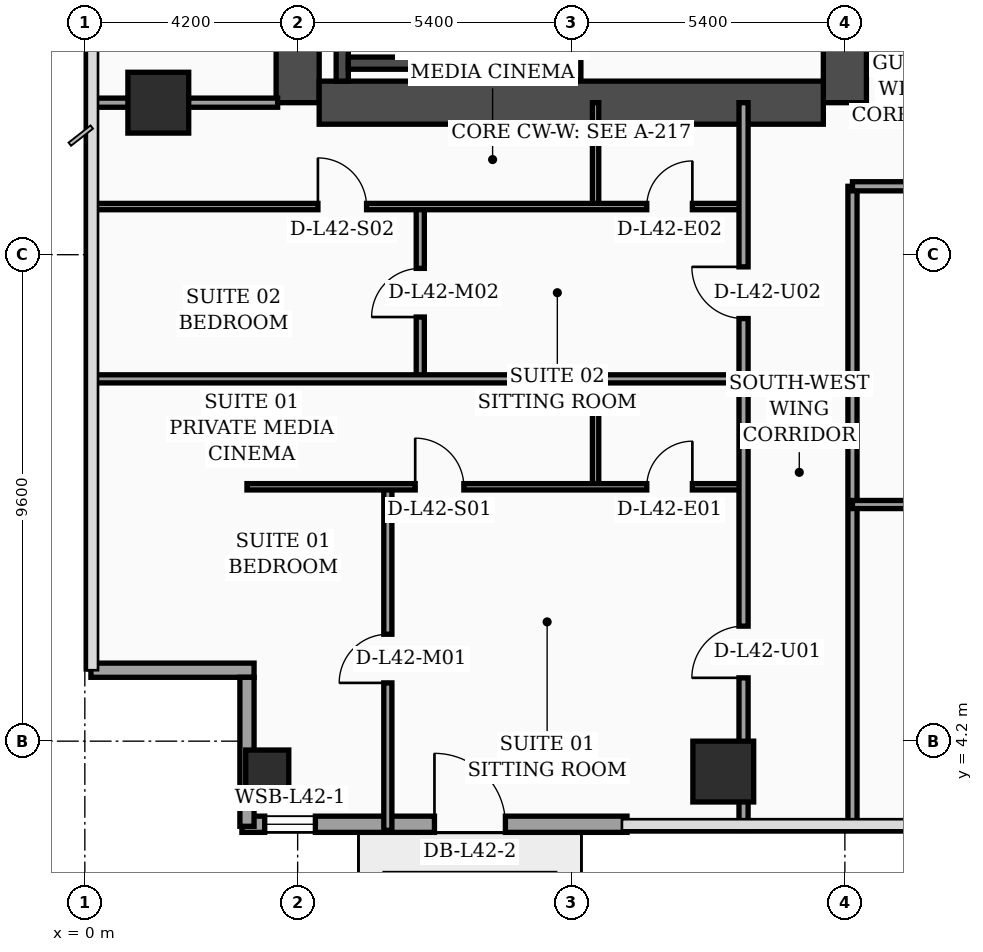
"""IFC4 building model, lengths in metres.
Left out: names, types, materials, properties, quantities, classifications, styles, units other than length and angle.
Written with IfcOpenShell. Run it as: python <this file> out.ifc"""

import sys

from ifc_helpers import new_model, si_unit, direction, frame, frame_2d, origin, origin_2d, place, context, subcontext, project, spatial, rectangle, hollow_rectangle, extrude, element, fill, save


model = new_model("IFC4")
c1 = context("Model", 3, precision=1e-05, world=origin(), true_north=direction((0.0, 1.0)))
c2 = subcontext(c1, "Body", "Model", "MODEL_VIEW")
j1 = project(units=[si_unit("LENGTHUNIT", "METRE"), si_unit("PLANEANGLEUNIT", "RADIAN")], contexts=[c1])
p1 = place(None, origin())
s1 = spatial("IfcSite", under=j1, at=p1, CompositionType="ELEMENT")
p2 = place(p1, origin())
s2 = spatial("IfcBuilding", under=s1, at=p2, CompositionType="ELEMENT")
p3 = place(p2, frame((0.0, 0.0, 171.3)))
s3 = spatial("IfcBuildingStorey", under=s2, at=p3, CompositionType="ELEMENT", Elevation=171.3)
p4 = place(p3, frame((4.2, 16.8, 0.0), z_axis=(0.0, 0.0, 1.0), x_axis=(0.0, 1.0, 0.0)))
e1 = element("IfcWall", 1, at=p4, inside=s3, PredefinedType="SHEAR", context=c2, shape_type="SweptSolid", body=[
    extrude(rectangle(XDim=21.6, YDim=0.85, at=frame_2d((10.8, 0.0))), origin(), (0.0, 0.0, 1.0), 3.56),
])
p5 = place(p3, frame((15.0, 16.8, 0.0), z_axis=(0.0, 0.0, 1.0), x_axis=(0.0, 1.0, 0.0)))
e2 = element("IfcWall", 2, at=p5, inside=s3, PredefinedType="SHEAR", context=c2, shape_type="SweptSolid", body=[
    extrude(rectangle(XDim=21.6, YDim=0.85, at=frame_2d((10.8, 0.0))), origin(), (0.0, 0.0, 1.0), 3.56),
])
p6 = place(p5, frame((8.65, 0.0, 0.0)))
e3 = element("IfcOpeningElement", 3, at=p6, cuts=e2, PredefinedType="OPENING", context=c2, shape_type="SweptSolid", body=[
    extrude(rectangle(XDim=1.1, YDim=2.2, at=frame_2d((0.55, 1.1))), frame((0.0, 0.435, 0.0), z_axis=(0.0, -1.0, 0.0), x_axis=(1.0, 0.0, 0.0)), (0.0, 0.0, 1.0), 0.87),
])
p7 = place(p5, frame((10.85, 0.0, 0.0)))
e4 = element("IfcOpeningElement", 4, at=p7, cuts=e2, PredefinedType="OPENING", context=c2, shape_type="SweptSolid", body=[
    extrude(rectangle(XDim=1.1, YDim=2.2, at=frame_2d((0.55, 1.1))), frame((0.0, 0.435, 0.0), z_axis=(0.0, -1.0, 0.0), x_axis=(1.0, 0.0, 0.0)), (0.0, 0.0, 1.0), 0.87),
])
p8 = place(p5, frame((13.5, 0.0, 0.0)))
e5 = element("IfcOpeningElement", 5, at=p8, cuts=e2, PredefinedType="OPENING", context=c2, shape_type="SweptSolid", body=[
    extrude(rectangle(XDim=1.1, YDim=2.2, at=frame_2d((0.55, 1.1))), frame((0.0, 0.435, 0.0), z_axis=(0.0, -1.0, 0.0), x_axis=(1.0, 0.0, 0.0)), (0.0, 0.0, 1.0), 0.87),
])
p9 = place(p5, frame((16.15, 0.0, 0.0)))
e6 = element("IfcOpeningElement", 6, at=p9, cuts=e2, PredefinedType="OPENING", context=c2, shape_type="SweptSolid", body=[
    extrude(rectangle(XDim=1.1, YDim=2.2, at=frame_2d((0.55, 1.1))), frame((0.0, 0.435, 0.0), z_axis=(0.0, -1.0, 0.0), x_axis=(1.0, 0.0, 0.0)), (0.0, 0.0, 1.0), 0.87),
])
p10 = place(p3, frame((4.625, 16.8, 0.0), z_axis=(0.0, 0.0, 1.0), x_axis=(1.0, 0.0, 0.0)))
e7 = element("IfcWall", 7, at=p10, inside=s3, PredefinedType="SHEAR", context=c2, shape_type="SweptSolid", body=[
    extrude(rectangle(XDim=9.95, YDim=0.85, at=frame_2d((4.975, 0.0))), origin(), (0.0, 0.0, 1.0), 3.56),
])
p11 = place(p3, frame((5.08, 17.225, 0.0), z_axis=(0.0, 0.0, 1.0), x_axis=(0.0, 1.0, 0.0)))
e8 = element("IfcWall", 8, at=p11, inside=s3, PredefinedType="SOLIDWALL", context=c2, shape_type="SweptSolid", body=[
    extrude(rectangle(XDim=9.565, YDim=0.24, at=frame_2d((4.782, 0.0))), origin(), (0.0, 0.0, 1.0), 3.56),
])
p12 = place(p3, frame((8.42, 17.225, 0.0), z_axis=(0.0, 0.0, 1.0), x_axis=(0.0, 1.0, 0.0)))
e9 = element("IfcWall", 9, at=p12, inside=s3, PredefinedType="SOLIDWALL", context=c2, shape_type="SweptSolid", body=[
    extrude(rectangle(XDim=9.565, YDim=0.24, at=frame_2d((4.782, 0.0))), origin(), (0.0, 0.0, 1.0), 3.56),
])
p13 = place(p12, frame((0.35, 0.0, 0.0)))
e10 = element("IfcOpeningElement", 10, at=p13, cuts=e9, PredefinedType="OPENING", context=c2, shape_type="SweptSolid", body=[
    extrude(rectangle(XDim=1.15, YDim=2.2, at=frame_2d((0.575, 1.1))), frame((0.0, 0.13, 0.0), z_axis=(0.0, -1.0, 0.0), x_axis=(1.0, 0.0, 0.0)), (0.0, 0.0, 1.0), 0.26),
])
p14 = place(p3, frame((5.2, 17.58, 0.0), z_axis=(0.0, 0.0, 1.0), x_axis=(1.0, 0.0, 0.0)))
e11 = element("IfcWall", 11, at=p14, inside=s3, PredefinedType="SOLIDWALL", context=c2, shape_type="SweptSolid", body=[
    extrude(rectangle(XDim=3.1, YDim=0.24, at=frame_2d((1.55, 0.0))), origin(), (0.0, 0.0, 1.0), 3.56),
])
p15 = place(p3, frame((3.6, 3.6, 0.0), z_axis=(0.0, 0.0, 1.0), x_axis=(1.0, 0.0, 0.0)))
e12 = element("IfcColumn", 12, at=p15, inside=s3, PredefinedType="COLUMN", context=c2, shape_type="SweptSolid", body=[
    extrude(hollow_rectangle(XDim=0.85, YDim=0.85, WallThickness=0.036, at=origin_2d()), origin(), (0.0, 0.0, 1.0), 3.56),
])
for number, where, z_axis, x_axis in (
    (13, (1.45, 16.8, 0.0), (0.0, 0.0, 1.0), (1.0, 0.0, 0.0)),
    (14, (12.6, 3.6, 0.0), (0.0, 0.0, 1.0), (1.0, 0.0, 0.0)),
):
    element("IfcColumn", number, at=place(p3, frame(where, z_axis=z_axis, x_axis=x_axis)), inside=s3, PredefinedType="COLUMN", context=c2, shape_type="SweptSolid", body=[
        extrude(rectangle(XDim=1.2, YDim=1.2, at=origin_2d()), origin(), (0.0, 0.0, 1.0), 3.56),
    ])
p16 = place(p3, frame((3.1, 2.56, 0.0), z_axis=(0.0, 0.0, 1.0), x_axis=(1.0, 0.0, 0.0)))
e15 = element("IfcWall", 15, at=p16, inside=s3, PredefinedType="SOLIDWALL", context=c2, shape_type="SweptSolid", body=[
    extrude(rectangle(XDim=7.6, YDim=0.32, at=frame_2d((3.8, 0.0))), origin(), (0.0, 0.0, 1.0), 3.56),
])
p17 = place(p16, frame((0.45, 0.0, 0.75)))
e16 = element("IfcOpeningElement", 16, at=p17, cuts=e15, PredefinedType="OPENING", context=c2, shape_type="SweptSolid", body=[
    extrude(rectangle(XDim=1.0, YDim=1.6, at=frame_2d((0.5, 0.8))), frame((0.0, 0.17, 0.0), z_axis=(0.0, -1.0, 0.0), x_axis=(1.0, 0.0, 0.0)), (0.0, 0.0, 1.0), 0.34),
])
p18 = place(p16, frame((3.8, 0.0, 0.0)))
e17 = element("IfcOpeningElement", 17, at=p18, cuts=e15, PredefinedType="OPENING", context=c2, shape_type="SweptSolid", body=[
    extrude(rectangle(XDim=1.4, YDim=2.25, at=frame_2d((0.7, 1.125))), frame((0.0, 0.17, 0.0), z_axis=(0.0, -1.0, 0.0), x_axis=(1.0, 0.0, 0.0)), (0.0, 0.0, 1.0), 0.34),
])
p19 = place(p3, frame((0.12, 5.6, 0.0), z_axis=(0.0, 0.0, 1.0), x_axis=(1.0, 0.0, 0.0)))
e18 = element("IfcWall", 18, at=p19, inside=s3, PredefinedType="SOLIDWALL", context=c2, shape_type="SweptSolid", body=[
    extrude(rectangle(XDim=3.22, YDim=0.28, at=frame_2d((1.61, 0.0))), origin(), (0.0, 0.0, 1.0), 2.94),
])
p20 = place(p3, frame((3.2, 5.46, 0.0), z_axis=(0.0, 0.0, 1.0), x_axis=(0.0, -1.0, 0.0)))
e19 = element("IfcWall", 19, at=p20, inside=s3, PredefinedType="SOLIDWALL", context=c2, shape_type="SweptSolid", body=[
    extrude(rectangle(XDim=2.94, YDim=0.28, at=frame_2d((1.47, 0.0))), origin(), (0.0, 0.0, 1.0), 2.94),
])
p21 = place(p3, frame((9.68, 17.245, 0.0), z_axis=(0.0, 0.0, 1.0), x_axis=(0.0, 1.0, 0.0)))
e20 = element("IfcWall", 20, at=p21, inside=s3, PredefinedType="SOLIDWALL", context=c2, shape_type="SweptSolid", body=[
    extrude(rectangle(XDim=7.755, YDim=0.22, at=frame_2d((3.877, 0.0))), origin(), (0.0, 0.0, 1.0), 3.56),
])
p22 = place(p3, frame((0.08, 16.8, 0.0), z_axis=(0.0, 0.0, 1.0), x_axis=(1.0, 0.0, 0.0)))
e21 = element("IfcWall", 21, at=p22, inside=s3, PredefinedType="PARTITIONING", context=c2, shape_type="SweptSolid", body=[
    extrude(rectangle(XDim=3.725, YDim=0.18, at=frame_2d((1.862, 0.0))), origin(), (0.0, 0.0, 1.0), 2.94),
])
p23 = place(p3, frame((10.08, 9.22, 0.0), z_axis=(0.0, 0.0, 1.0), x_axis=(0.0, 1.0, 0.0)))
e22 = element("IfcWall", 22, at=p23, inside=s3, PredefinedType="PARTITIONING", context=c2, shape_type="SweptSolid", body=[
    extrude(rectangle(XDim=2.13, YDim=0.125, at=frame_2d((1.065, 0.0))), origin(), (0.0, 0.0, 1.0), 3.09),
])
p24 = place(p3, frame((5.98, 2.44, 0.0), z_axis=(0.0, 0.0, 1.0), x_axis=(0.0, 1.0, 0.0)))
e23 = element("IfcWall", 23, at=p24, inside=s3, PredefinedType="PARTITIONING", context=c2, shape_type="SweptSolid", body=[
    extrude(rectangle(XDim=6.78, YDim=0.16, at=frame_2d((3.39, 0.0))), origin(), (0.0, 0.0, 1.0), 3.04),
])
p25 = place(p24, frame((2.91, 0.0, 0.0)))
e24 = element("IfcOpeningElement", 24, at=p25, cuts=e23, PredefinedType="OPENING", context=c2, shape_type="SweptSolid", body=[
    extrude(rectangle(XDim=0.96, YDim=2.2, at=frame_2d((0.48, 1.1))), frame((0.0, 0.09, 0.0), z_axis=(0.0, -1.0, 0.0), x_axis=(1.0, 0.0, 0.0)), (0.0, 0.0, 1.0), 0.18),
])
p26 = place(p3, frame((3.2, 9.22, 0.0), z_axis=(0.0, 0.0, 1.0), x_axis=(1.0, 0.0, 0.0)))
e25 = element("IfcWall", 25, at=p26, inside=s3, PredefinedType="PARTITIONING", context=c2, shape_type="SweptSolid", body=[
    extrude(rectangle(XDim=9.8, YDim=0.125, at=frame_2d((4.9, 0.0))), origin(), (0.0, 0.0, 1.0), 2.94),
])
p27 = place(p26, frame((3.32, 0.0, 0.0)))
e26 = element("IfcOpeningElement", 26, at=p27, cuts=e25, PredefinedType="OPENING", context=c2, shape_type="SweptSolid", body=[
    extrude(rectangle(XDim=0.96, YDim=2.2, at=frame_2d((0.48, 1.1))), frame((0.0, 0.073, 0.0), z_axis=(0.0, -1.0, 0.0), x_axis=(1.0, 0.0, 0.0)), (0.0, 0.0, 1.0), 0.145),
])
p28 = place(p26, frame((7.89, 0.0, 0.0)))
e27 = element("IfcOpeningElement", 27, at=p28, cuts=e25, PredefinedType="OPENING", context=c2, shape_type="SweptSolid", body=[
    extrude(rectangle(XDim=0.9, YDim=2.15, at=frame_2d((0.45, 1.075))), frame((0.0, 0.073, 0.0), z_axis=(0.0, -1.0, 0.0), x_axis=(1.0, 0.0, 0.0)), (0.0, 0.0, 1.0), 0.145),
])
p29 = place(p3, frame((10.08, 14.75, 0.0), z_axis=(0.0, 0.0, 1.0), x_axis=(0.0, 1.0, 0.0)))
e28 = element("IfcWall", 28, at=p29, inside=s3, PredefinedType="PARTITIONING", context=c2, shape_type="SweptSolid", body=[
    extrude(rectangle(XDim=2.05, YDim=0.125, at=frame_2d((1.025, 0.0))), origin(), (0.0, 0.0, 1.0), 3.56),
])
p30 = place(p3, frame((6.62, 11.35, 0.0), z_axis=(0.0, 0.0, 1.0), x_axis=(0.0, 1.0, 0.0)))
e29 = element("IfcWall", 29, at=p30, inside=s3, PredefinedType="PARTITIONING", context=c2, shape_type="SweptSolid", body=[
    extrude(rectangle(XDim=3.4, YDim=0.16, at=frame_2d((1.7, 0.0))), origin(), (0.0, 0.0, 1.0), 3.56),
])
p31 = place(p30, frame((1.22, 0.0, 0.0)))
e30 = element("IfcOpeningElement", 30, at=p31, cuts=e29, PredefinedType="OPENING", context=c2, shape_type="SweptSolid", body=[
    extrude(rectangle(XDim=0.96, YDim=2.2, at=frame_2d((0.48, 1.1))), frame((0.0, 0.09, 0.0), z_axis=(0.0, -1.0, 0.0), x_axis=(1.0, 0.0, 0.0)), (0.0, 0.0, 1.0), 0.18),
])
p32 = place(p3, frame((0.08, 14.75, 0.0), z_axis=(0.0, 0.0, 1.0), x_axis=(1.0, 0.0, 0.0)))
e31 = element("IfcWall", 31, at=p32, inside=s3, PredefinedType="PARTITIONING", context=c2, shape_type="SweptSolid", body=[
    extrude(rectangle(XDim=12.92, YDim=0.125, at=frame_2d((6.46, 0.0))), origin(), (0.0, 0.0, 1.0), 2.94),
])
p33 = place(p32, frame((4.52, 0.0, 0.0)))
e32 = element("IfcOpeningElement", 32, at=p33, cuts=e31, PredefinedType="OPENING", context=c2, shape_type="SweptSolid", body=[
    extrude(rectangle(XDim=0.96, YDim=2.2, at=frame_2d((0.48, 1.1))), frame((0.0, 0.073, 0.0), z_axis=(0.0, -1.0, 0.0), x_axis=(1.0, 0.0, 0.0)), (0.0, 0.0, 1.0), 0.145),
])
p34 = place(p32, frame((11.01, 0.0, 0.0)))
e33 = element("IfcOpeningElement", 33, at=p34, cuts=e31, PredefinedType="OPENING", context=c2, shape_type="SweptSolid", body=[
    extrude(rectangle(XDim=0.9, YDim=2.15, at=frame_2d((0.45, 1.075))), frame((0.0, 0.073, 0.0), z_axis=(0.0, -1.0, 0.0), x_axis=(1.0, 0.0, 0.0)), (0.0, 0.0, 1.0), 0.145),
])
p35 = place(p3, frame((0.08, 11.35, 0.0), z_axis=(0.0, 0.0, 1.0), x_axis=(1.0, 0.0, 0.0)))
e34 = element("IfcWall", 34, at=p35, inside=s3, PredefinedType="PARTITIONING", context=c2, shape_type="SweptSolid", body=[
    extrude(rectangle(XDim=12.92, YDim=0.16, at=frame_2d((6.46, 0.0))), origin(), (0.0, 0.0, 1.0), 2.94),
])
p36 = place(p3, frame((13.0, 2.44, 0.0), z_axis=(0.0, 0.0, 1.0), x_axis=(0.0, 1.0, 0.0)))
e35 = element("IfcWall", 35, at=p36, inside=s3, PredefinedType="PARTITIONING", context=c2, shape_type="SweptSolid", body=[
    extrude(rectangle(XDim=14.36, YDim=0.18, at=frame_2d((7.18, 0.0))), origin(), (0.0, 0.0, 1.0), 2.94),
])
p37 = place(p36, frame((3.01, 0.0, 0.0)))
e36 = element("IfcOpeningElement", 36, at=p37, cuts=e35, PredefinedType="OPENING", context=c2, shape_type="SweptSolid", body=[
    extrude(rectangle(XDim=1.02, YDim=2.2, at=frame_2d((0.51, 1.1))), frame((0.0, 0.1, 0.0), z_axis=(0.0, -1.0, 0.0), x_axis=(1.0, 0.0, 0.0)), (0.0, 0.0, 1.0), 0.2),
])
p38 = place(p36, frame((10.1, 0.0, 0.0)))
e37 = element("IfcOpeningElement", 37, at=p38, cuts=e35, PredefinedType="OPENING", context=c2, shape_type="SweptSolid", body=[
    extrude(rectangle(XDim=1.02, YDim=2.2, at=frame_2d((0.51, 1.1))), frame((0.0, 0.1, 0.0), z_axis=(0.0, -1.0, 0.0), x_axis=(1.0, 0.0, 0.0)), (0.0, 0.0, 1.0), 0.2),
])
p39 = place(p3, frame((15.15, 2.44, 0.0), z_axis=(0.0, 0.0, 1.0), x_axis=(0.0, 1.0, 0.0)))
e38 = element("IfcWall", 38, at=p39, inside=s3, PredefinedType="PARTITIONING", context=c2, shape_type="SweptSolid", body=[
    extrude(rectangle(XDim=12.71, YDim=0.18, at=frame_2d((6.355, 0.0))), origin(), (0.0, 0.0, 1.0), 3.04),
])
p40 = place(p3, frame((15.15, 8.87, 0.0), z_axis=(0.0, 0.0, 1.0), x_axis=(1.0, 0.0, 0.0)))
e39 = element("IfcWall", 39, at=p40, inside=s3, PredefinedType="PARTITIONING", context=c2, shape_type="SweptSolid", body=[
    extrude(rectangle(XDim=4.45, YDim=0.16, at=frame_2d((2.225, 0.0))), origin(), (0.0, 0.0, 1.0), 3.56),
])
p41 = place(p40, frame((1.75, 0.0, 0.0)))
e40 = element("IfcOpeningElement", 40, at=p41, cuts=e39, PredefinedType="OPENING", context=c2, shape_type="SweptSolid", body=[
    extrude(rectangle(XDim=0.96, YDim=2.2, at=frame_2d((0.48, 1.1))), frame((0.0, 0.09, 0.0), z_axis=(0.0, -1.0, 0.0), x_axis=(1.0, 0.0, 0.0)), (0.0, 0.0, 1.0), 0.18),
])
p42 = place(p3, frame((15.15, 15.15, 0.0), z_axis=(0.0, 0.0, 1.0), x_axis=(1.0, 0.0, 0.0)))
e41 = element("IfcWall", 41, at=p42, inside=s3, PredefinedType="PARTITIONING", context=c2, shape_type="SweptSolid", body=[
    extrude(rectangle(XDim=6.45, YDim=0.18, at=frame_2d((3.225, 0.0))), origin(), (0.0, 0.0, 1.0), 2.49),
])
p43 = place(p42, frame((1.74, 0.0, 0.0)))
e42 = element("IfcOpeningElement", 42, at=p43, cuts=e41, PredefinedType="OPENING", context=c2, shape_type="SweptSolid", body=[
    extrude(rectangle(XDim=1.02, YDim=2.2, at=frame_2d((0.51, 1.1))), frame((0.0, 0.1, 0.0), z_axis=(0.0, -1.0, 0.0), x_axis=(1.0, 0.0, 0.0)), (0.0, 0.0, 1.0), 0.2),
])
p44 = place(p17, origin())
e43 = element("IfcWindow", 43, at=p44, inside=s3, PartitioningType="SINGLE_PANEL", PredefinedType="WINDOW", context=c2, shape_type="SweptSolid", body=[
    extrude(rectangle(XDim=1.0, YDim=1.6, at=frame_2d((0.5, 0.8))), frame((0.0, 0.03, 0.0), z_axis=(0.0, -1.0, 0.0), x_axis=(1.0, 0.0, 0.0)), (0.0, 0.0, 1.0), 0.06),
])
fill(e16, e43)
p45 = place(p18, origin())
e44 = element("IfcDoor", 44, at=p45, inside=s3, OperationType="SINGLE_SWING_LEFT", PredefinedType="DOOR", context=c2, shape_type="SweptSolid", body=[
    extrude(rectangle(XDim=1.4, YDim=2.25, at=frame_2d((0.7, 1.125))), frame((0.0, 0.025, 0.0), z_axis=(0.0, -1.0, 0.0), x_axis=(1.0, 0.0, 0.0)), (0.0, 0.0, 1.0), 0.05),
])
fill(e17, e44)
p46 = place(p25, origin())
e45 = element("IfcDoor", 45, at=p46, inside=s3, OperationType="SINGLE_SWING_LEFT", PredefinedType="DOOR", context=c2, shape_type="SweptSolid", body=[
    extrude(rectangle(XDim=0.96, YDim=2.2, at=frame_2d((0.48, 1.1))), frame((0.0, 0.025, 0.0), z_axis=(0.0, -1.0, 0.0), x_axis=(1.0, 0.0, 0.0)), (0.0, 0.0, 1.0), 0.05),
])
fill(e24, e45)
p47 = place(p27, origin())
e46 = element("IfcDoor", 46, at=p47, inside=s3, OperationType="SINGLE_SWING_LEFT", PredefinedType="DOOR", context=c2, shape_type="SweptSolid", body=[
    extrude(rectangle(XDim=0.96, YDim=2.2, at=frame_2d((0.48, 1.1))), frame((0.0, 0.025, 0.0), z_axis=(0.0, -1.0, 0.0), x_axis=(1.0, 0.0, 0.0)), (0.0, 0.0, 1.0), 0.05),
])
fill(e26, e46)
p48 = place(p28, origin())
e47 = element("IfcDoor", 47, at=p48, inside=s3, OperationType="SINGLE_SWING_RIGHT", PredefinedType="DOOR", context=c2, shape_type="SweptSolid", body=[
    extrude(rectangle(XDim=0.9, YDim=2.15, at=frame_2d((0.45, 1.075))), frame((0.0, 0.025, 0.0), z_axis=(0.0, -1.0, 0.0), x_axis=(1.0, 0.0, 0.0)), (0.0, 0.0, 1.0), 0.05),
])
fill(e27, e47)
p49 = place(p31, origin())
e48 = element("IfcDoor", 48, at=p49, inside=s3, OperationType="SINGLE_SWING_LEFT", PredefinedType="DOOR", context=c2, shape_type="SweptSolid", body=[
    extrude(rectangle(XDim=0.96, YDim=2.2, at=frame_2d((0.48, 1.1))), frame((0.0, 0.025, 0.0), z_axis=(0.0, -1.0, 0.0), x_axis=(1.0, 0.0, 0.0)), (0.0, 0.0, 1.0), 0.05),
])
fill(e30, e48)
p50 = place(p33, origin())
e49 = element("IfcDoor", 49, at=p50, inside=s3, OperationType="SINGLE_SWING_LEFT", PredefinedType="DOOR", context=c2, shape_type="SweptSolid", body=[
    extrude(rectangle(XDim=0.96, YDim=2.2, at=frame_2d((0.48, 1.1))), frame((0.0, 0.025, 0.0), z_axis=(0.0, -1.0, 0.0), x_axis=(1.0, 0.0, 0.0)), (0.0, 0.0, 1.0), 0.05),
])
fill(e32, e49)
p51 = place(p34, origin())
e50 = element("IfcDoor", 50, at=p51, inside=s3, OperationType="SINGLE_SWING_RIGHT", PredefinedType="DOOR", context=c2, shape_type="SweptSolid", body=[
    extrude(rectangle(XDim=0.9, YDim=2.15, at=frame_2d((0.45, 1.075))), frame((0.0, 0.025, 0.0), z_axis=(0.0, -1.0, 0.0), x_axis=(1.0, 0.0, 0.0)), (0.0, 0.0, 1.0), 0.05),
])
fill(e33, e50)
p52 = place(p37, origin())
e51 = element("IfcDoor", 51, at=p52, inside=s3, OperationType="SINGLE_SWING_LEFT", PredefinedType="DOOR", context=c2, shape_type="SweptSolid", body=[
    extrude(rectangle(XDim=1.02, YDim=2.2, at=frame_2d((0.51, 1.1))), frame((0.0, 0.025, 0.0), z_axis=(0.0, -1.0, 0.0), x_axis=(1.0, 0.0, 0.0)), (0.0, 0.0, 1.0), 0.05),
])
fill(e36, e51)
p53 = place(p38, origin())
e52 = element("IfcDoor", 52, at=p53, inside=s3, OperationType="SINGLE_SWING_RIGHT", PredefinedType="DOOR", context=c2, shape_type="SweptSolid", body=[
    extrude(rectangle(XDim=1.02, YDim=2.2, at=frame_2d((0.51, 1.1))), frame((0.0, 0.025, 0.0), z_axis=(0.0, -1.0, 0.0), x_axis=(1.0, 0.0, 0.0)), (0.0, 0.0, 1.0), 0.05),
])
fill(e37, e52)
p54 = place(p13, origin())
e53 = element("IfcDoor", 53, at=p54, inside=s3, OperationType="SINGLE_SWING_LEFT", PredefinedType="DOOR", context=c2, shape_type="SweptSolid", body=[
    extrude(rectangle(XDim=1.15, YDim=2.2, at=frame_2d((0.575, 1.1))), frame((0.0, 0.025, 0.0), z_axis=(0.0, -1.0, 0.0), x_axis=(1.0, 0.0, 0.0)), (0.0, 0.0, 1.0), 0.05),
])
fill(e10, e53)
save(model, sys.argv[1])
